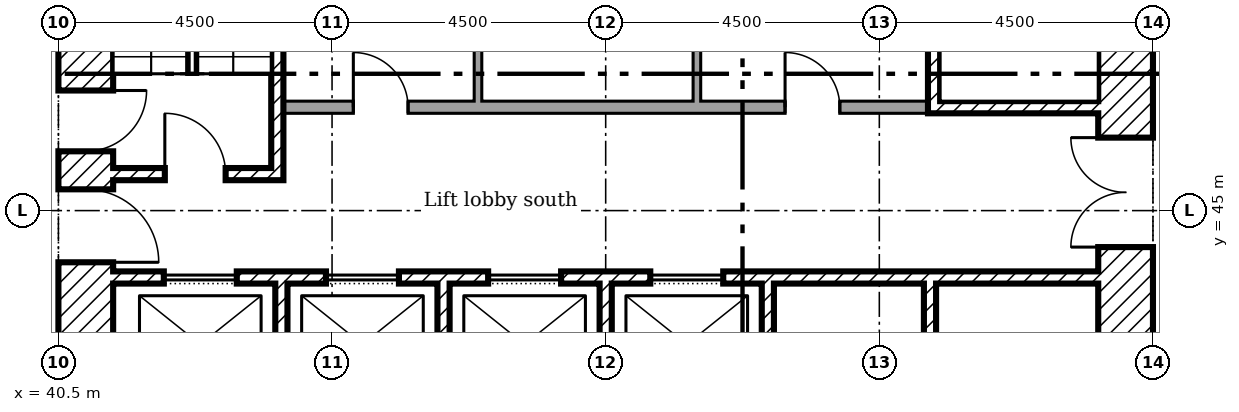
"""IFC4 building model, lengths in metres.
Left out: names, types, materials, properties, quantities, classifications, styles, units other than length and angle.
Written with IfcOpenShell. Run it as: python <this file> out.ifc"""

import sys

from ifc_helpers import new_model, si_unit, direction, frame, frame_2d, origin, place, context, subcontext, project, spatial, rectangle, extrude, element, fill, save


model = new_model("IFC4")
c1 = context("Model", 3, precision=1e-05, world=origin(), true_north=direction((0.0, 1.0)))
c2 = subcontext(c1, "Body", "Model", "MODEL_VIEW")
j1 = project(units=[si_unit("LENGTHUNIT", "METRE"), si_unit("PLANEANGLEUNIT", "RADIAN")], contexts=[c1])
p1 = place(None, origin())
s1 = spatial("IfcSite", under=j1, at=p1, CompositionType="ELEMENT")
p2 = place(p1, origin())
s2 = spatial("IfcBuilding", under=s1, at=p2, CompositionType="ELEMENT")
p3 = place(p2, frame((0.0, 0.0, 25.4)))
s3 = spatial("IfcBuildingStorey", under=s2, at=p3, CompositionType="ELEMENT", Elevation=25.4)
p4 = place(p3, frame((58.05, 40.5, 0.0), z_axis=(0.0, 0.0, 1.0), x_axis=(0.0, 1.0, 0.0)))
e1 = element("IfcWall", 1, at=p4, inside=s3, PredefinedType="SHEAR", context=c2, shape_type="SweptSolid", body=[
    extrude(rectangle(XDim=18.0, YDim=0.9, at=frame_2d((9.0, 0.0))), origin(), (0.0, 0.0, 1.0), 4.125),
])
p5 = place(p4, frame((13.15, 0.0, 0.0)))
e2 = element("IfcOpeningElement", 2, at=p5, cuts=e1, PredefinedType="OPENING", context=c2, shape_type="SweptSolid", body=[
    extrude(rectangle(XDim=1.2, YDim=2.1, at=frame_2d((0.6, 1.05))), frame((0.0, 0.46, 0.0), z_axis=(0.0, -1.0, 0.0), x_axis=(1.0, 0.0, 0.0)), (0.0, 0.0, 1.0), 0.92),
])
p6 = place(p4, frame((3.9, 0.0, 0.0)))
e3 = element("IfcOpeningElement", 3, at=p6, cuts=e1, PredefinedType="OPENING", context=c2, shape_type="SweptSolid", body=[
    extrude(rectangle(XDim=1.8, YDim=2.1, at=frame_2d((0.9, 1.05))), frame((0.0, 0.46, 0.0), z_axis=(0.0, -1.0, 0.0), x_axis=(1.0, 0.0, 0.0)), (0.0, 0.0, 1.0), 0.92),
])
p7 = place(p4, frame((11.525, 0.0, 0.0)))
e4 = element("IfcOpeningElement", 4, at=p7, cuts=e1, PredefinedType="OPENING", context=c2, shape_type="SweptSolid", body=[
    extrude(rectangle(XDim=1.0, YDim=2.1, at=frame_2d((0.5, 1.05))), frame((0.0, 0.46, 0.0), z_axis=(0.0, -1.0, 0.0), x_axis=(1.0, 0.0, 0.0)), (0.0, 0.0, 1.0), 0.92),
])
p8 = place(p3, frame((40.95, 40.5, 0.0), z_axis=(0.0, 0.0, 1.0), x_axis=(0.0, 1.0, 0.0)))
e5 = element("IfcWall", 5, at=p8, inside=s3, PredefinedType="SHEAR", context=c2, shape_type="SweptSolid", body=[
    extrude(rectangle(XDim=18.0, YDim=0.9, at=frame_2d((9.0, 0.0))), origin(), (0.0, 0.0, 1.0), 4.125),
])
p9 = place(p8, frame((3.65, 0.0, 0.0)))
e6 = element("IfcOpeningElement", 6, at=p9, cuts=e5, PredefinedType="OPENING", context=c2, shape_type="SweptSolid", body=[
    extrude(rectangle(XDim=1.2, YDim=2.1, at=frame_2d((0.6, 1.05))), frame((0.0, 0.46, 0.0), z_axis=(0.0, -1.0, 0.0), x_axis=(1.0, 0.0, 0.0)), (0.0, 0.0, 1.0), 0.92),
])
p10 = place(p8, frame((5.475, 0.0, 0.0)))
e7 = element("IfcOpeningElement", 7, at=p10, cuts=e5, PredefinedType="OPENING", context=c2, shape_type="SweptSolid", body=[
    extrude(rectangle(XDim=1.0, YDim=2.1, at=frame_2d((0.5, 1.05))), frame((0.0, 0.46, 0.0), z_axis=(0.0, -1.0, 0.0), x_axis=(1.0, 0.0, 0.0)), (0.0, 0.0, 1.0), 0.92),
])
p11 = place(p8, frame((12.3, 0.0, 0.0)))
e8 = element("IfcOpeningElement", 8, at=p11, cuts=e5, PredefinedType="OPENING", context=c2, shape_type="SweptSolid", body=[
    extrude(rectangle(XDim=1.0, YDim=2.1, at=frame_2d((0.5, 1.05))), frame((0.0, 0.46, 0.0), z_axis=(0.0, -1.0, 0.0), x_axis=(1.0, 0.0, 0.0)), (0.0, 0.0, 1.0), 0.92),
])
for number, where, z_axis, x_axis in (
    (9, (44.167, 41.4, 0.0), (0.0, 0.0, 1.0), (0.0, 1.0, 0.0)),
    (10, (46.833, 41.4, 0.0), (0.0, 0.0, 1.0), (0.0, 1.0, 0.0)),
    (11, (49.5, 41.4, 0.0), (0.0, 0.0, 1.0), (0.0, 1.0, 0.0)),
    (12, (52.167, 41.4, 0.0), (0.0, 0.0, 1.0), (0.0, 1.0, 0.0)),
    (13, (54.833, 41.4, 0.0), (0.0, 0.0, 1.0), (0.0, 1.0, 0.0)),
):
    element("IfcWall", number, at=place(p3, frame(where, z_axis=z_axis, x_axis=x_axis)), inside=s3, PredefinedType="SHEAR", context=c2, shape_type="SweptSolid", body=[
        extrude(rectangle(XDim=2.4, YDim=0.2, at=frame_2d((1.2, 0.0))), origin(), (0.0, 0.0, 1.0), 4.125),
    ])
p12 = place(p3, frame((41.4, 43.9, 0.0)))
e14 = element("IfcWall", 14, at=p12, inside=s3, PredefinedType="SHEAR", context=c2, shape_type="SweptSolid", body=[
    extrude(rectangle(XDim=16.2, YDim=0.2, at=frame_2d((8.1, 0.0))), origin(), (0.0, 0.0, 1.0), 4.125),
])
p13 = place(p12, frame((0.833, 0.0, 0.0)))
e15 = element("IfcOpeningElement", 15, at=p13, cuts=e14, PredefinedType="OPENING", context=c2, shape_type="SweptSolid", body=[
    extrude(rectangle(XDim=1.2, YDim=2.1, at=frame_2d((0.6, 1.05))), frame((0.0, 0.11, 0.0), z_axis=(0.0, -1.0, 0.0), x_axis=(1.0, 0.0, 0.0)), (0.0, 0.0, 1.0), 0.22),
])
p14 = place(p12, frame((3.5, 0.0, 0.0)))
e16 = element("IfcOpeningElement", 16, at=p14, cuts=e14, PredefinedType="OPENING", context=c2, shape_type="SweptSolid", body=[
    extrude(rectangle(XDim=1.2, YDim=2.1, at=frame_2d((0.6, 1.05))), frame((0.0, 0.11, 0.0), z_axis=(0.0, -1.0, 0.0), x_axis=(1.0, 0.0, 0.0)), (0.0, 0.0, 1.0), 0.22),
])
p15 = place(p12, frame((6.167, 0.0, 0.0)))
e17 = element("IfcOpeningElement", 17, at=p15, cuts=e14, PredefinedType="OPENING", context=c2, shape_type="SweptSolid", body=[
    extrude(rectangle(XDim=1.2, YDim=2.1, at=frame_2d((0.6, 1.05))), frame((0.0, 0.11, 0.0), z_axis=(0.0, -1.0, 0.0), x_axis=(1.0, 0.0, 0.0)), (0.0, 0.0, 1.0), 0.22),
])
p16 = place(p12, frame((8.833, 0.0, 0.0)))
e18 = element("IfcOpeningElement", 18, at=p16, cuts=e14, PredefinedType="OPENING", context=c2, shape_type="SweptSolid", body=[
    extrude(rectangle(XDim=1.2, YDim=2.1, at=frame_2d((0.6, 1.05))), frame((0.0, 0.11, 0.0), z_axis=(0.0, -1.0, 0.0), x_axis=(1.0, 0.0, 0.0)), (0.0, 0.0, 1.0), 0.22),
])
p17 = place(p3, frame((44.1, 45.5, 0.0), z_axis=(0.0, 0.0, 1.0), x_axis=(0.0, 1.0, 0.0)))
e19 = element("IfcWall", 19, at=p17, inside=s3, PredefinedType="SHEAR", context=c2, shape_type="SweptSolid", body=[
    extrude(rectangle(XDim=6.9, YDim=0.2, at=frame_2d((3.45, 0.0))), origin(), (0.0, 0.0, 1.0), 4.125),
])
p18 = place(p3, frame((41.4, 45.6, 0.0)))
e20 = element("IfcWall", 20, at=p18, inside=s3, PredefinedType="SHEAR", context=c2, shape_type="SweptSolid", body=[
    extrude(rectangle(XDim=2.6, YDim=0.2, at=frame_2d((1.3, 0.0))), origin(), (0.0, 0.0, 1.0), 4.125),
])
p19 = place(p18, frame((0.85, 0.0, 0.0)))
e21 = element("IfcOpeningElement", 21, at=p19, cuts=e20, PredefinedType="OPENING", context=c2, shape_type="SweptSolid", body=[
    extrude(rectangle(XDim=1.0, YDim=2.1, at=frame_2d((0.5, 1.05))), frame((0.0, 0.11, 0.0), z_axis=(0.0, -1.0, 0.0), x_axis=(1.0, 0.0, 0.0)), (0.0, 0.0, 1.0), 0.22),
])
p20 = place(p3, frame((54.8, 46.7, 0.0)))
e22 = element("IfcWall", 22, at=p20, inside=s3, PredefinedType="SHEAR", context=c2, shape_type="SweptSolid", body=[
    extrude(rectangle(XDim=2.8, YDim=0.2, at=frame_2d((1.4, 0.0))), origin(), (0.0, 0.0, 1.0), 4.125),
])
p21 = place(p3, frame((54.9, 46.8, 0.0), z_axis=(0.0, 0.0, 1.0), x_axis=(0.0, 1.0, 0.0)))
e23 = element("IfcWall", 23, at=p21, inside=s3, PredefinedType="SHEAR", context=c2, shape_type="SweptSolid", body=[
    extrude(rectangle(XDim=6.5, YDim=0.2, at=frame_2d((3.25, 0.0))), origin(), (0.0, 0.0, 1.0), 4.125),
])
p22 = place(p3, frame((44.2, 46.7, 0.0)))
e24 = element("IfcWall", 24, at=p22, inside=s3, PredefinedType="PARTITIONING", context=c2, shape_type="SweptSolid", body=[
    extrude(rectangle(XDim=10.6, YDim=0.2, at=frame_2d((5.3, 0.0))), origin(), (0.0, 0.0, 1.0), 4.125),
])
p23 = place(p22, frame((1.15, 0.0, 0.0)))
e25 = element("IfcOpeningElement", 25, at=p23, cuts=e24, PredefinedType="OPENING", context=c2, shape_type="SweptSolid", body=[
    extrude(rectangle(XDim=0.9, YDim=2.1, at=frame_2d((0.45, 1.05))), frame((0.0, 0.11, 0.0), z_axis=(0.0, -1.0, 0.0), x_axis=(1.0, 0.0, 0.0)), (0.0, 0.0, 1.0), 0.22),
])
p24 = place(p22, frame((8.25, 0.0, 0.0)))
e26 = element("IfcOpeningElement", 26, at=p24, cuts=e24, PredefinedType="OPENING", context=c2, shape_type="SweptSolid", body=[
    extrude(rectangle(XDim=0.9, YDim=2.1, at=frame_2d((0.45, 1.05))), frame((0.0, 0.11, 0.0), z_axis=(0.0, -1.0, 0.0), x_axis=(1.0, 0.0, 0.0)), (0.0, 0.0, 1.0), 0.22),
])
p25 = place(p3, frame((47.4, 46.8, 0.0), z_axis=(0.0, 0.0, 1.0), x_axis=(0.0, 1.0, 0.0)))
e27 = element("IfcWall", 27, at=p25, inside=s3, PredefinedType="PARTITIONING", context=c2, shape_type="SweptSolid", body=[
    extrude(rectangle(XDim=5.0, YDim=0.125, at=frame_2d((2.5, 0.0))), origin(), (0.0, 0.0, 1.0), 4.125),
])
p26 = place(p3, frame((51.0, 46.8, 0.0), z_axis=(0.0, 0.0, 1.0), x_axis=(0.0, 1.0, 0.0)))
e28 = element("IfcWall", 28, at=p26, inside=s3, PredefinedType="PARTITIONING", context=c2, shape_type="SweptSolid", body=[
    extrude(rectangle(XDim=2.262, YDim=0.125, at=frame_2d((1.131, 0.0))), origin(), (0.0, 0.0, 1.0), 4.125),
])
p27 = place(p6, origin())
e29 = element("IfcDoor", 29, at=p27, inside=s3, OperationType="DOUBLE_DOOR_SINGLE_SWING", PredefinedType="DOOR", context=c2, shape_type="SweptSolid", body=[
    extrude(rectangle(XDim=1.8, YDim=2.1, at=frame_2d((0.9, 1.05))), frame((0.0, 0.025, 0.0), z_axis=(0.0, -1.0, 0.0), x_axis=(1.0, 0.0, 0.0)), (0.0, 0.0, 1.0), 0.05),
])
fill(e3, e29)
p28 = place(p9, frame((1.2, 0.0, 0.0), x_axis=(-1.0, 0.0, 0.0)))
e30 = element("IfcDoor", 30, at=p28, inside=s3, OperationType="SINGLE_SWING_LEFT", PredefinedType="DOOR", context=c2, shape_type="SweptSolid", body=[
    extrude(rectangle(XDim=1.2, YDim=2.1, at=frame_2d((0.6, 1.05))), frame((0.0, 0.025, 0.0), z_axis=(0.0, -1.0, 0.0), x_axis=(1.0, 0.0, 0.0)), (0.0, 0.0, 1.0), 0.05),
])
fill(e6, e30)
p29 = place(p19, origin())
e31 = element("IfcDoor", 31, at=p29, inside=s3, OperationType="SINGLE_SWING_RIGHT", PredefinedType="DOOR", context=c2, shape_type="SweptSolid", body=[
    extrude(rectangle(XDim=1.0, YDim=2.1, at=frame_2d((0.5, 1.05))), frame((0.0, 0.025, 0.0), z_axis=(0.0, -1.0, 0.0), x_axis=(1.0, 0.0, 0.0)), (0.0, 0.0, 1.0), 0.05),
])
fill(e21, e31)
p30 = place(p10, frame((1.0, 0.0, 0.0), x_axis=(-1.0, 0.0, 0.0)))
e32 = element("IfcDoor", 32, at=p30, inside=s3, OperationType="SINGLE_SWING_RIGHT", PredefinedType="DOOR", context=c2, shape_type="SweptSolid", body=[
    extrude(rectangle(XDim=1.0, YDim=2.1, at=frame_2d((0.5, 1.05))), frame((0.0, 0.025, 0.0), z_axis=(0.0, -1.0, 0.0), x_axis=(1.0, 0.0, 0.0)), (0.0, 0.0, 1.0), 0.05),
])
fill(e7, e32)
p31 = place(p23, origin())
e33 = element("IfcDoor", 33, at=p31, inside=s3, OperationType="SINGLE_SWING_RIGHT", PredefinedType="DOOR", context=c2, shape_type="SweptSolid", body=[
    extrude(rectangle(XDim=0.9, YDim=2.1, at=frame_2d((0.45, 1.05))), frame((0.0, 0.025, 0.0), z_axis=(0.0, -1.0, 0.0), x_axis=(1.0, 0.0, 0.0)), (0.0, 0.0, 1.0), 0.05),
])
fill(e25, e33)
p32 = place(p24, origin())
e34 = element("IfcDoor", 34, at=p32, inside=s3, OperationType="SINGLE_SWING_RIGHT", PredefinedType="DOOR", context=c2, shape_type="SweptSolid", body=[
    extrude(rectangle(XDim=0.9, YDim=2.1, at=frame_2d((0.45, 1.05))), frame((0.0, 0.025, 0.0), z_axis=(0.0, -1.0, 0.0), x_axis=(1.0, 0.0, 0.0)), (0.0, 0.0, 1.0), 0.05),
])
fill(e26, e34)
p33 = place(p13, origin())
e35 = element("IfcDoor", 35, at=p33, inside=s3, OperationType="SLIDING_TO_LEFT", PredefinedType="DOOR", context=c2, shape_type="SweptSolid", body=[
    extrude(rectangle(XDim=1.2, YDim=2.1, at=frame_2d((0.6, 1.05))), frame((0.0, 0.025, 0.0), z_axis=(0.0, -1.0, 0.0), x_axis=(1.0, 0.0, 0.0)), (0.0, 0.0, 1.0), 0.05),
])
fill(e15, e35)
p34 = place(p14, origin())
e36 = element("IfcDoor", 36, at=p34, inside=s3, OperationType="SLIDING_TO_LEFT", PredefinedType="DOOR", context=c2, shape_type="SweptSolid", body=[
    extrude(rectangle(XDim=1.2, YDim=2.1, at=frame_2d((0.6, 1.05))), frame((0.0, 0.025, 0.0), z_axis=(0.0, -1.0, 0.0), x_axis=(1.0, 0.0, 0.0)), (0.0, 0.0, 1.0), 0.05),
])
fill(e16, e36)
p35 = place(p15, origin())
e37 = element("IfcDoor", 37, at=p35, inside=s3, OperationType="SLIDING_TO_LEFT", PredefinedType="DOOR", context=c2, shape_type="SweptSolid", body=[
    extrude(rectangle(XDim=1.2, YDim=2.1, at=frame_2d((0.6, 1.05))), frame((0.0, 0.025, 0.0), z_axis=(0.0, -1.0, 0.0), x_axis=(1.0, 0.0, 0.0)), (0.0, 0.0, 1.0), 0.05),
])
fill(e17, e37)
p36 = place(p16, origin())
e38 = element("IfcDoor", 38, at=p36, inside=s3, OperationType="SLIDING_TO_LEFT", PredefinedType="DOOR", context=c2, shape_type="SweptSolid", body=[
    extrude(rectangle(XDim=1.2, YDim=2.1, at=frame_2d((0.6, 1.05))), frame((0.0, 0.025, 0.0), z_axis=(0.0, -1.0, 0.0), x_axis=(1.0, 0.0, 0.0)), (0.0, 0.0, 1.0), 0.05),
])
fill(e18, e38)
save(model, sys.argv[1])
